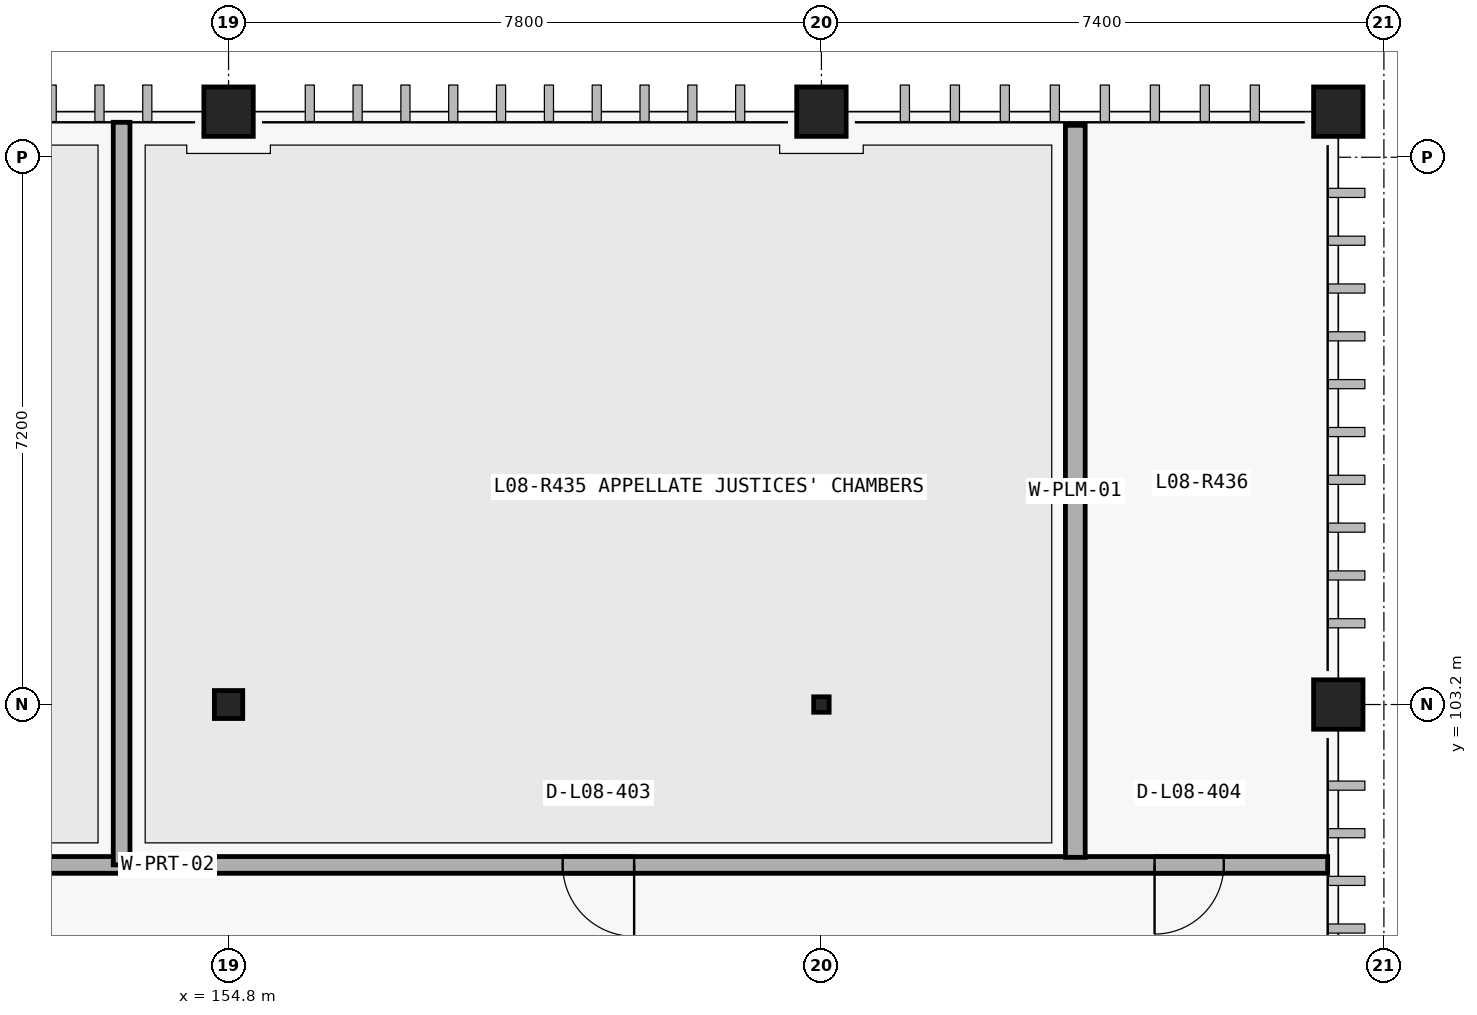
"""IFC4 building model, lengths in metres.
Left out: names, types, materials, properties, quantities, classifications, styles, units other than length and angle.
Written with IfcOpenShell. Run it as: python <this file> out.ifc"""

import sys

from ifc_helpers import new_model, si_unit, direction, frame, frame_2d, origin_with_axes, origin_2d_with_axis, place, context, subcontext, project, spatial, rectangle, hollow_rectangle, circle, i_section, extrude, element, fill, save


model = new_model("IFC4")
c1 = context("Model", 3, precision=1e-05, world=origin_with_axes(), true_north=direction((0.0, 1.0)))
c2 = subcontext(c1, "Body", "Model", "MODEL_VIEW")
j1 = project(units=[si_unit("LENGTHUNIT", "METRE"), si_unit("PLANEANGLEUNIT", "RADIAN")], contexts=[c1])
p1 = place(None, origin_with_axes())
s1 = spatial("IfcSite", under=j1, at=p1, CompositionType="ELEMENT")
p2 = place(p1, origin_with_axes())
s2 = spatial("IfcBuilding", under=s1, at=p2, CompositionType="ELEMENT")
p3 = place(p2, frame((0.0, 0.0, 39.0), z_axis=(0.0, 0.0, 1.0), x_axis=(1.0, 0.0, 0.0)))
s3 = spatial("IfcBuildingStorey", under=s2, at=p3, CompositionType="ELEMENT", Elevation=39.0)
p4 = place(None, frame((138.74, 101.09, 39.0), z_axis=(0.0, 0.0, 1.0), x_axis=(1.0, 0.0, 0.0)))
e1 = element("IfcWall", 1, at=p4, inside=s3, PredefinedType="PARTITIONING", context=c2, shape_type="SweptSolid", body=[
    extrude(rectangle(XDim=30.52, YDim=0.22, at=frame_2d((15.26, 0.0), x_axis=(1.0, 0.0))), origin_with_axes(), (0.0, 0.0, 1.0), 4.18),
])
p5 = place(None, frame((146.228, 101.09, 39.0), z_axis=(0.0, 0.0, 1.0), x_axis=(1.0, 0.0, 0.0)))
e2 = element("IfcOpeningElement", 2, at=p5, cuts=e1, PredefinedType="OPENING", context=c2, shape_type="SweptSolid", body=[
    extrude(rectangle(XDim=1.88, YDim=2.56, at=frame_2d((0.0, 1.28), x_axis=(1.0, 0.0))), frame((0.0, 0.12, 0.0), z_axis=(0.0, -1.0, 0.0), x_axis=(1.0, 0.0, 0.0)), (0.0, 0.0, 1.0), 0.24),
])
p6 = place(None, frame((159.666, 101.09, 39.0), z_axis=(0.0, 0.0, 1.0), x_axis=(1.0, 0.0, 0.0)))
e3 = element("IfcOpeningElement", 3, at=p6, cuts=e1, PredefinedType="OPENING", context=c2, shape_type="SweptSolid", body=[
    extrude(rectangle(XDim=0.94, YDim=2.3, at=frame_2d((0.0, 1.15), x_axis=(1.0, 0.0))), frame((0.0, 0.12, 0.0), z_axis=(0.0, -1.0, 0.0), x_axis=(1.0, 0.0, 0.0)), (0.0, 0.0, 1.0), 0.24),
])
p7 = place(None, frame((167.438, 101.09, 39.0), z_axis=(0.0, 0.0, 1.0), x_axis=(1.0, 0.0, 0.0)))
e4 = element("IfcOpeningElement", 4, at=p7, cuts=e1, PredefinedType="OPENING", context=c2, shape_type="SweptSolid", body=[
    extrude(rectangle(XDim=0.91, YDim=2.12, at=frame_2d((0.0, 1.06), x_axis=(1.0, 0.0))), frame((0.0, 0.12, 0.0), z_axis=(0.0, -1.0, 0.0), x_axis=(1.0, 0.0, 0.0)), (0.0, 0.0, 1.0), 0.24),
])
p8 = place(None, frame((165.94, 101.19, 39.0), z_axis=(0.0, 0.0, 1.0), x_axis=(0.0, 1.0, 0.0)))
e5 = element("IfcWall", 5, at=p8, inside=s3, PredefinedType="PLUMBINGWALL", context=c2, shape_type="SweptSolid", body=[
    extrude(rectangle(XDim=9.63, YDim=0.26, at=frame_2d((4.815, 0.0), x_axis=(1.0, 0.0))), origin_with_axes(), (0.0, 0.0, 1.0), 4.18),
])
p9 = place(None, frame((153.393, 101.09, 39.0), z_axis=(0.0, 0.0, 1.0), x_axis=(0.0, 1.0, 0.0)))
e6 = element("IfcWall", 6, at=p9, inside=s3, PredefinedType="PARTITIONING", context=c2, shape_type="SweptSolid", body=[
    extrude(rectangle(XDim=9.77, YDim=0.22, at=frame_2d((4.885, 0.0), x_axis=(1.0, 0.0))), origin_with_axes(), (0.0, 0.0, 1.0), 4.18),
])
p10 = place(None, frame((154.8, 103.2, 39.0), z_axis=(0.0, 0.0, 1.0), x_axis=(1.0, 0.0, 0.0)))
e7 = element("IfcColumn", 7, at=p10, inside=s3, PredefinedType="COLUMN", context=c2, shape_type="SweptSolid", body=[
    extrude(i_section(OverallWidth=0.373, OverallDepth=0.368, WebThickness=0.015, FlangeThickness=0.024, at=origin_2d_with_axis()), origin_with_axes(), (0.0, 0.0, 1.0), 4.5),
])
p11 = place(None, frame((154.8, 111.0, 39.0), z_axis=(0.0, 0.0, 1.0), x_axis=(1.0, 0.0, 0.0)))
e8 = element("IfcColumn", 8, at=p11, inside=s3, PredefinedType="COLUMN", context=c2, shape_type="SweptSolid", body=[
    extrude(circle(Radius=0.325, at=origin_2d_with_axis()), origin_with_axes(), (0.0, 0.0, 1.0), 4.5),
])
p12 = place(None, frame((162.6, 103.2, 39.0), z_axis=(0.0, 0.0, 1.0), x_axis=(1.0, 0.0, 0.0)))
e9 = element("IfcColumn", 9, at=p12, inside=s3, PredefinedType="COLUMN", context=c2, shape_type="SweptSolid", body=[
    extrude(hollow_rectangle(XDim=0.203, YDim=0.203, WallThickness=0.011, InnerFilletRadius=0.022, OuterFilletRadius=0.011, at=origin_2d_with_axis()), origin_with_axes(), (0.0, 0.0, 1.0), 4.5),
])
for number, where, z_axis, x_axis in (
    (10, (162.6, 111.0, 39.0), (0.0, 0.0, 1.0), (1.0, 0.0, 0.0)),
    (11, (169.4, 103.2, 39.0), (0.0, 0.0, 1.0), (1.0, 0.0, 0.0)),
    (12, (169.4, 111.0, 39.0), (0.0, 0.0, 1.0), (1.0, 0.0, 0.0)),
):
    element("IfcColumn", number, at=place(None, frame(where, z_axis=z_axis, x_axis=x_axis)), inside=s3, PredefinedType="COLUMN", context=c2, shape_type="SweptSolid", body=[
        extrude(circle(Radius=0.325, at=origin_2d_with_axis()), origin_with_axes(), (0.0, 0.0, 1.0), 4.5),
    ])
p13 = place(None, frame((159.666, 101.09, 39.0), z_axis=(0.0, 0.0, 1.0), x_axis=(-1.0, 0.0, 0.0)))
e13 = element("IfcDoor", 13, at=p13, inside=s3, OperationType="SINGLE_SWING_RIGHT", PredefinedType="DOOR", context=c2, shape_type="SweptSolid", body=[
    extrude(rectangle(XDim=0.94, YDim=2.3, at=frame_2d((0.0, 1.15), x_axis=(1.0, 0.0))), frame((0.0, 0.04, 0.0), z_axis=(0.0, -1.0, 0.0), x_axis=(1.0, 0.0, 0.0)), (0.0, 0.0, 1.0), 0.08),
])
fill(e3, e13)
p14 = place(None, frame((167.438, 101.09, 39.0), z_axis=(0.0, 0.0, 1.0), x_axis=(-1.0, 0.0, 0.0)))
e14 = element("IfcDoor", 14, at=p14, inside=s3, OperationType="SINGLE_SWING_LEFT", PredefinedType="DOOR", context=c2, shape_type="SweptSolid", body=[
    extrude(rectangle(XDim=0.91, YDim=2.12, at=frame_2d((0.0, 1.06), x_axis=(1.0, 0.0))), frame((0.0, 0.04, 0.0), z_axis=(0.0, -1.0, 0.0), x_axis=(1.0, 0.0, 0.0)), (0.0, 0.0, 1.0), 0.08),
])
fill(e4, e14)
save(model, sys.argv[1])
